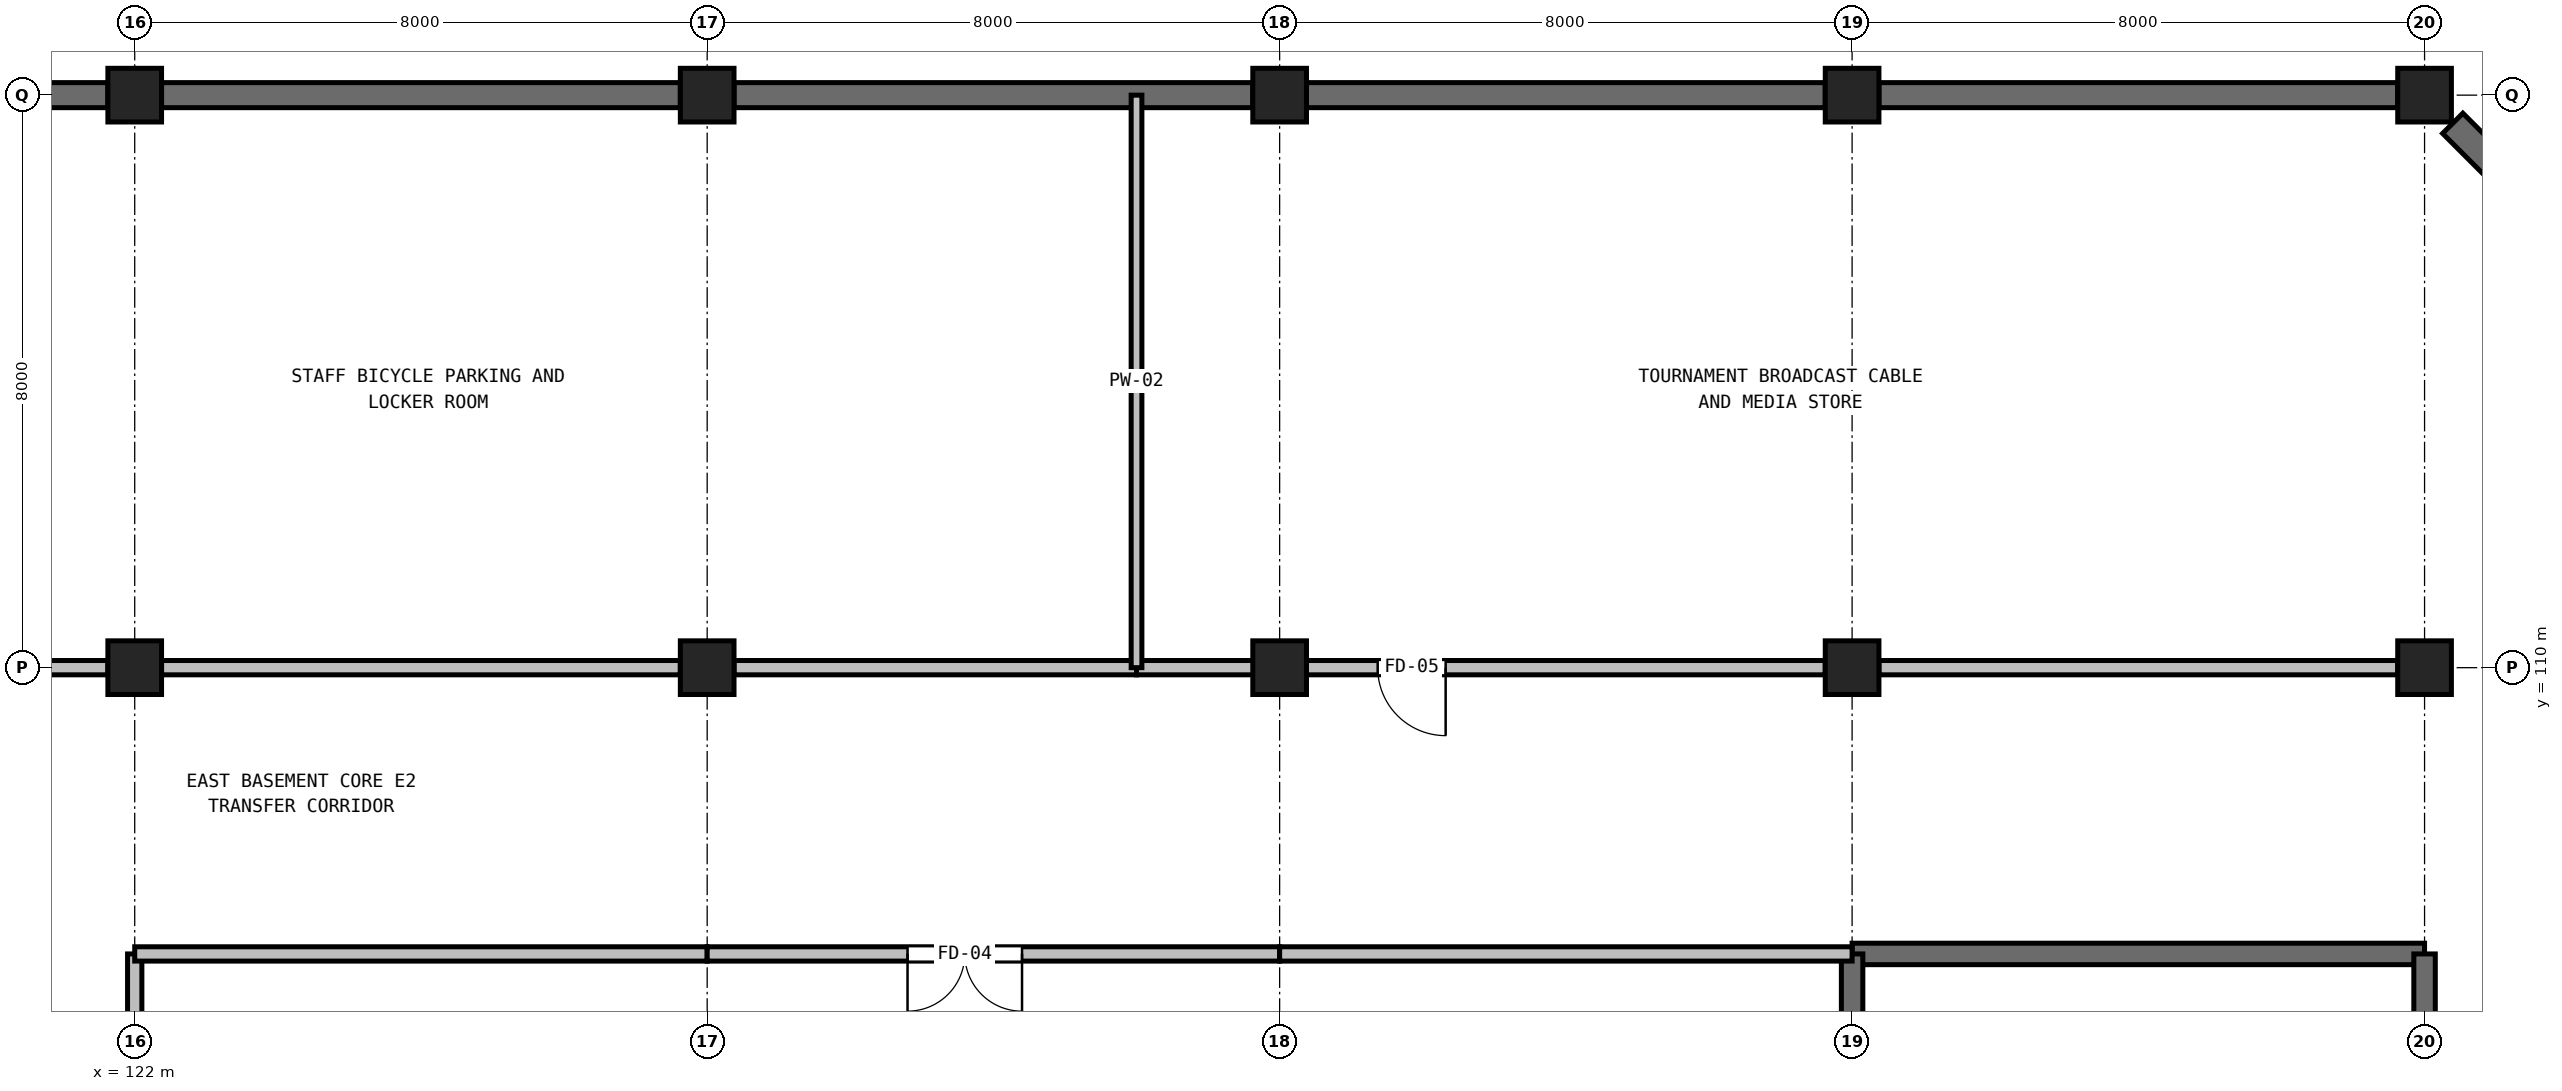
"""IFC4 building model, lengths in metres.
Left out: names, types, materials, properties, quantities, classifications, styles, units other than length and angle.
Written with IfcOpenShell. Run it as: python <this file> out.ifc"""

import sys

from ifc_helpers import new_model, si_unit, direction, frame, frame_2d, origin, origin_2d, place, context, subcontext, project, spatial, rectangle, extrude, element, fill, save


model = new_model("IFC4")
c1 = context("Model", 3, precision=1e-05, world=origin(), true_north=direction((0.0, 1.0)))
c2 = subcontext(c1, "Body", "Model", "MODEL_VIEW")
j1 = project(units=[si_unit("LENGTHUNIT", "METRE"), si_unit("PLANEANGLEUNIT", "RADIAN")], contexts=[c1])
p1 = place(None, origin())
s1 = spatial("IfcSite", under=j1, at=p1, CompositionType="ELEMENT")
p2 = place(p1, origin())
s2 = spatial("IfcBuilding", under=s1, at=p2, CompositionType="ELEMENT")
p3 = place(p2, frame((0.0, 0.0, -4.2)))
s3 = spatial("IfcBuildingStorey", under=s2, at=p3, CompositionType="ELEMENT", Elevation=-4.2)
for number, where, z_axis, x_axis in (
    (1, (122.0, 110.0, 0.0), (0.0, 0.0, 1.0), (1.0, 0.0, 0.0)),
    (2, (122.0, 118.0, 0.0), (0.0, 0.0, 1.0), (1.0, 0.0, 0.0)),
    (3, (130.0, 110.0, 0.0), (0.0, 0.0, 1.0), (1.0, 0.0, 0.0)),
    (4, (130.0, 118.0, 0.0), (0.0, 0.0, 1.0), (1.0, 0.0, 0.0)),
    (5, (138.0, 110.0, 0.0), (0.0, 0.0, 1.0), (1.0, 0.0, 0.0)),
    (6, (138.0, 118.0, 0.0), (0.0, 0.0, 1.0), (1.0, 0.0, 0.0)),
    (7, (146.0, 110.0, 0.0), (0.0, 0.0, 1.0), (1.0, 0.0, 0.0)),
    (8, (146.0, 118.0, 0.0), (0.0, 0.0, 1.0), (1.0, 0.0, 0.0)),
    (9, (154.0, 110.0, 0.0), (0.0, 0.0, 1.0), (1.0, 0.0, 0.0)),
    (10, (154.0, 118.0, 0.0), (0.0, 0.0, 1.0), (1.0, 0.0, 0.0)),
):
    element("IfcColumn", number, at=place(p3, frame(where, z_axis=z_axis, x_axis=x_axis)), inside=s3, PredefinedType="COLUMN", context=c2, shape_type="SweptSolid", body=[
        extrude(rectangle(XDim=0.75, YDim=0.75, at=origin_2d()), origin(), (0.0, 0.0, 1.0), 4.2),
    ])
for number, where, z_axis, x_axis in (
    (11, (114.375, 118.0, 0.0), (0.0, 0.0, 1.0), (1.0, 0.0, 0.0)),
    (12, (122.375, 118.0, 0.0), (0.0, 0.0, 1.0), (1.0, 0.0, 0.0)),
    (13, (130.375, 118.0, 0.0), (0.0, 0.0, 1.0), (1.0, 0.0, 0.0)),
    (14, (138.375, 118.0, 0.0), (0.0, 0.0, 1.0), (1.0, 0.0, 0.0)),
    (15, (146.375, 118.0, 0.0), (0.0, 0.0, 1.0), (1.0, 0.0, 0.0)),
):
    element("IfcWall", number, at=place(p3, frame(where, z_axis=z_axis, x_axis=x_axis)), inside=s3, PredefinedType="USERDEFINED", context=c2, shape_type="SweptSolid", body=[
        extrude(rectangle(XDim=7.25, YDim=0.35, at=frame_2d((3.625, 0.0))), origin(), (0.0, 0.0, 1.0), 3.92),
    ])
p4 = place(p3, frame((154.394, 117.606, 0.0), z_axis=(0.0, 0.0, 1.0), x_axis=(0.707106781187, -0.707106781187, 0.0)))
e16 = element("IfcWall", 16, at=p4, inside=s3, PredefinedType="USERDEFINED", context=c2, shape_type="SweptSolid", body=[
    extrude(rectangle(XDim=10.2, YDim=0.4, at=frame_2d((5.1, 0.0))), origin(), (0.0, 0.0, 1.0), 3.92),
])
p5 = place(p3, frame((146.0, 106.0, 0.0), z_axis=(0.0, 0.0, 1.0), x_axis=(1.0, 0.0, 0.0)))
e17 = element("IfcWall", 17, at=p5, inside=s3, PredefinedType="SHEAR", context=c2, shape_type="SweptSolid", body=[
    extrude(rectangle(XDim=8.0, YDim=0.3, at=frame_2d((4.0, 0.0))), origin(), (0.0, 0.0, 1.0), 3.98),
])
p6 = place(p3, frame((146.0, 102.375, 0.0), z_axis=(0.0, 0.0, 1.0), x_axis=(0.0, 1.0, 0.0)))
e18 = element("IfcWall", 18, at=p6, inside=s3, PredefinedType="SHEAR", context=c2, shape_type="SweptSolid", body=[
    extrude(rectangle(XDim=3.625, YDim=0.3, at=frame_2d((1.812, 0.0))), origin(), (0.0, 0.0, 1.0), 3.98),
])
p7 = place(p6, frame((0.25, 0.0, 0.0)))
e19 = element("IfcOpeningElement", 19, at=p7, cuts=e18, PredefinedType="OPENING", context=c2, shape_type="SweptSolid", body=[
    extrude(rectangle(XDim=1.05, YDim=2.2, at=frame_2d((0.525, 1.1))), frame((0.0, 0.16, 0.0), z_axis=(0.0, -1.0, 0.0), x_axis=(1.0, 0.0, 0.0)), (0.0, 0.0, 1.0), 0.32),
])
p8 = place(p3, frame((154.0, 102.375, 0.0), z_axis=(0.0, 0.0, 1.0), x_axis=(0.0, 1.0, 0.0)))
e20 = element("IfcWall", 20, at=p8, inside=s3, PredefinedType="SHEAR", context=c2, shape_type="SweptSolid", body=[
    extrude(rectangle(XDim=3.625, YDim=0.3, at=frame_2d((1.812, 0.0))), origin(), (0.0, 0.0, 1.0), 3.98),
])
p9 = place(p3, frame((122.0, 102.375, 0.0), z_axis=(0.0, 0.0, 1.0), x_axis=(0.0, 1.0, 0.0)))
e21 = element("IfcWall", 21, at=p9, inside=s3, PredefinedType="PARTITIONING", context=c2, shape_type="SweptSolid", body=[
    extrude(rectangle(XDim=3.625, YDim=0.2, at=frame_2d((1.812, 0.0))), origin(), (0.0, 0.0, 1.0), 3.32),
])
p10 = place(p3, frame((122.0, 106.0, 0.0), z_axis=(0.0, 0.0, 1.0), x_axis=(1.0, 0.0, 0.0)))
e22 = element("IfcWall", 22, at=p10, inside=s3, PredefinedType="PARTITIONING", context=c2, shape_type="SweptSolid", body=[
    extrude(rectangle(XDim=8.0, YDim=0.2, at=frame_2d((4.0, 0.0))), origin(), (0.0, 0.0, 1.0), 3.9),
])
p11 = place(p3, frame((130.0, 106.0, 0.0), z_axis=(0.0, 0.0, 1.0), x_axis=(1.0, 0.0, 0.0)))
e23 = element("IfcWall", 23, at=p11, inside=s3, PredefinedType="PARTITIONING", context=c2, shape_type="SweptSolid", body=[
    extrude(rectangle(XDim=8.0, YDim=0.2, at=frame_2d((4.0, 0.0))), origin(), (0.0, 0.0, 1.0), 3.9),
])
p12 = place(p11, frame((2.8, 0.0, 0.0)))
e24 = element("IfcOpeningElement", 24, at=p12, cuts=e23, PredefinedType="OPENING", context=c2, shape_type="SweptSolid", body=[
    extrude(rectangle(XDim=1.6, YDim=2.2, at=frame_2d((0.8, 1.1))), frame((0.0, 0.11, 0.0), z_axis=(0.0, -1.0, 0.0), x_axis=(1.0, 0.0, 0.0)), (0.0, 0.0, 1.0), 0.22),
])
p13 = place(p3, frame((138.0, 106.0, 0.0), z_axis=(0.0, 0.0, 1.0), x_axis=(1.0, 0.0, 0.0)))
e25 = element("IfcWall", 25, at=p13, inside=s3, PredefinedType="PARTITIONING", context=c2, shape_type="SweptSolid", body=[
    extrude(rectangle(XDim=8.0, YDim=0.2, at=frame_2d((4.0, 0.0))), origin(), (0.0, 0.0, 1.0), 3.9),
])
p14 = place(p3, frame((114.375, 110.0, 0.0), z_axis=(0.0, 0.0, 1.0), x_axis=(1.0, 0.0, 0.0)))
e26 = element("IfcWall", 26, at=p14, inside=s3, PredefinedType="PARTITIONING", context=c2, shape_type="SweptSolid", body=[
    extrude(rectangle(XDim=7.25, YDim=0.2, at=frame_2d((3.625, 0.0))), origin(), (0.0, 0.0, 1.0), 3.02),
])
p15 = place(p14, frame((2.54, 0.0, 0.0)))
e27 = element("IfcOpeningElement", 27, at=p15, cuts=e26, PredefinedType="OPENING", context=c2, shape_type="SweptSolid", body=[
    extrude(rectangle(XDim=1.6, YDim=2.2, at=frame_2d((0.8, 1.1))), frame((0.0, 0.11, 0.0), z_axis=(0.0, -1.0, 0.0), x_axis=(1.0, 0.0, 0.0)), (0.0, 0.0, 1.0), 0.22),
])
p16 = place(p3, frame((122.375, 110.0, 0.0), z_axis=(0.0, 0.0, 1.0), x_axis=(1.0, 0.0, 0.0)))
e28 = element("IfcWall", 28, at=p16, inside=s3, PredefinedType="PARTITIONING", context=c2, shape_type="SweptSolid", body=[
    extrude(rectangle(XDim=7.25, YDim=0.2, at=frame_2d((3.625, 0.0))), origin(), (0.0, 0.0, 1.0), 3.02),
])
p17 = place(p3, frame((130.375, 110.0, 0.0), z_axis=(0.0, 0.0, 1.0), x_axis=(1.0, 0.0, 0.0)))
e29 = element("IfcWall", 29, at=p17, inside=s3, PredefinedType="PARTITIONING", context=c2, shape_type="SweptSolid", body=[
    extrude(rectangle(XDim=5.625, YDim=0.2, at=frame_2d((2.812, 0.0))), origin(), (0.0, 0.0, 1.0), 2.92),
])
p18 = place(p3, frame((136.0, 110.0, 0.0), z_axis=(0.0, 0.0, 1.0), x_axis=(1.0, 0.0, 0.0)))
e30 = element("IfcWall", 30, at=p18, inside=s3, PredefinedType="PARTITIONING", context=c2, shape_type="SweptSolid", body=[
    extrude(rectangle(XDim=9.625, YDim=0.2, at=frame_2d((4.812, 0.0))), origin(), (0.0, 0.0, 1.0), 2.92),
])
p19 = place(p18, frame((3.37, 0.0, 0.0)))
e31 = element("IfcOpeningElement", 31, at=p19, cuts=e30, PredefinedType="OPENING", context=c2, shape_type="SweptSolid", body=[
    extrude(rectangle(XDim=0.95, YDim=2.15, at=frame_2d((0.475, 1.075))), frame((0.0, 0.11, 0.0), z_axis=(0.0, -1.0, 0.0), x_axis=(1.0, 0.0, 0.0)), (0.0, 0.0, 1.0), 0.22),
])
p20 = place(p3, frame((146.375, 110.0, 0.0), z_axis=(0.0, 0.0, 1.0), x_axis=(1.0, 0.0, 0.0)))
e32 = element("IfcWall", 32, at=p20, inside=s3, PredefinedType="PARTITIONING", context=c2, shape_type="SweptSolid", body=[
    extrude(rectangle(XDim=7.25, YDim=0.2, at=frame_2d((3.625, 0.0))), origin(), (0.0, 0.0, 1.0), 2.82),
])
p21 = place(p3, frame((136.0, 110.0, 0.0), z_axis=(0.0, 0.0, 1.0), x_axis=(0.0, 1.0, 0.0)))
e33 = element("IfcWall", 33, at=p21, inside=s3, PredefinedType="PARTITIONING", context=c2, shape_type="SweptSolid", body=[
    extrude(rectangle(XDim=8.0, YDim=0.15, at=frame_2d((4.0, 0.0))), origin(), (0.0, 0.0, 1.0), 3.9),
])
p22 = place(p12, frame((1.6, 0.0, 0.0), z_axis=(0.0, 0.0, 1.0), x_axis=(-1.0, 0.0, 0.0)))
e34 = element("IfcDoor", 34, at=p22, inside=s3, OperationType="DOUBLE_DOOR_SINGLE_SWING", PredefinedType="DOOR", context=c2, shape_type="SweptSolid", body=[
    extrude(rectangle(XDim=1.6, YDim=2.2, at=frame_2d((0.8, 1.1))), frame((0.0, 0.025, 0.0), z_axis=(0.0, -1.0, 0.0), x_axis=(1.0, 0.0, 0.0)), (0.0, 0.0, 1.0), 0.05),
])
fill(e24, e34)
p23 = place(p19, frame((0.95, 0.0, 0.0), z_axis=(0.0, 0.0, 1.0), x_axis=(-1.0, 0.0, 0.0)))
e35 = element("IfcDoor", 35, at=p23, inside=s3, OperationType="SINGLE_SWING_RIGHT", PredefinedType="DOOR", context=c2, shape_type="SweptSolid", body=[
    extrude(rectangle(XDim=0.95, YDim=2.15, at=frame_2d((0.475, 1.075))), frame((0.0, 0.025, 0.0), z_axis=(0.0, -1.0, 0.0), x_axis=(1.0, 0.0, 0.0)), (0.0, 0.0, 1.0), 0.05),
])
fill(e31, e35)
save(model, sys.argv[1])
